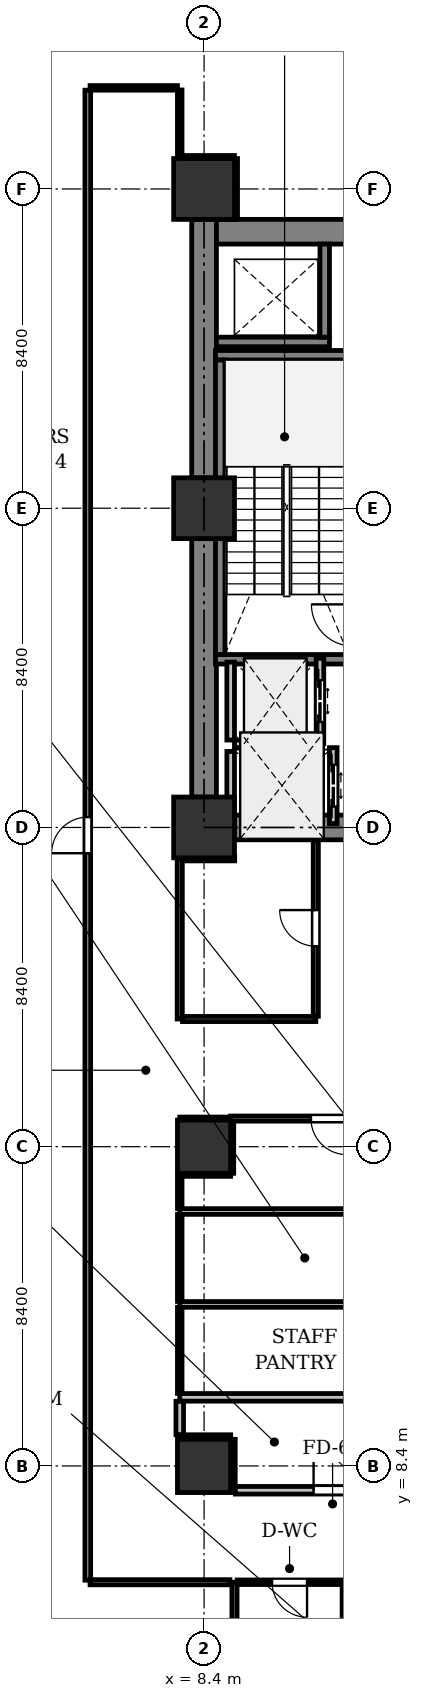
"""IFC4 building model, lengths in metres.
Left out: names, types, materials, properties, quantities, classifications, styles, units other than length and angle.
Written with IfcOpenShell. Run it as: python <this file> out.ifc"""

import sys

from ifc_helpers import new_model, si_unit, direction, frame, frame_2d, origin, origin_2d, place, context, subcontext, project, spatial, rectangle, extrude, element, fill, save


model = new_model("IFC4")
c1 = context("Model", 3, precision=1e-05, world=origin(), true_north=direction((0.0, 1.0)))
c2 = subcontext(c1, "Body", "Model", "MODEL_VIEW")
j1 = project(units=[si_unit("LENGTHUNIT", "METRE"), si_unit("PLANEANGLEUNIT", "RADIAN")], contexts=[c1])
p1 = place(None, origin())
s1 = spatial("IfcSite", under=j1, at=p1, CompositionType="ELEMENT")
p2 = place(p1, origin())
s2 = spatial("IfcBuilding", under=s1, at=p2, CompositionType="ELEMENT")
p3 = place(p2, frame((0.0, 0.0, 10.2)))
s3 = spatial("IfcBuildingStorey", under=s2, at=p3, CompositionType="ELEMENT", Elevation=10.2)
for number, where, z_axis, x_axis in (
    (1, (8.4, 8.4, 0.0), (0.0, 0.0, 1.0), (1.0, 0.0, 0.0)),
    (2, (8.4, 16.8, 0.0), (0.0, 0.0, 1.0), (1.0, 0.0, 0.0)),
):
    element("IfcColumn", number, at=place(p3, frame(where, z_axis=z_axis, x_axis=x_axis)), inside=s3, PredefinedType="COLUMN", context=c2, shape_type="SweptSolid", body=[
        extrude(rectangle(XDim=1.4, YDim=1.4, at=origin_2d()), origin(), (0.0, 0.0, 1.0), 4.8),
    ])
for number, where, z_axis, x_axis in (
    (3, (8.4, 25.2, 0.0), (0.0, 0.0, 1.0), (1.0, 0.0, 0.0)),
    (4, (8.4, 33.6, 0.0), (0.0, 0.0, 1.0), (1.0, 0.0, 0.0)),
    (5, (8.4, 42.0, 0.0), (0.0, 0.0, 1.0), (1.0, 0.0, 0.0)),
):
    element("IfcColumn", number, at=place(p3, frame(where, z_axis=z_axis, x_axis=x_axis)), inside=s3, PredefinedType="COLUMN", context=c2, shape_type="SweptSolid", body=[
        extrude(rectangle(XDim=1.6, YDim=1.6, at=origin_2d()), origin(), (0.0, 0.0, 1.0), 4.8),
    ])
for number, where, z_axis, x_axis in (
    (6, (8.4, 26.0, 0.0), (0.0, 0.0, 1.0), (0.0, 1.0, 0.0)),
    (7, (8.4, 34.4, 0.0), (0.0, 0.0, 1.0), (0.0, 1.0, 0.0)),
):
    element("IfcWall", number, at=place(p3, frame(where, z_axis=z_axis, x_axis=x_axis)), inside=s3, PredefinedType="SHEAR", context=c2, shape_type="SweptSolid", body=[
        extrude(rectangle(XDim=6.8, YDim=0.65, at=frame_2d((3.4, 0.0))), origin(), (0.0, 0.0, 1.0), 4.525),
    ])
p4 = place(p3, frame((8.725, 40.875, 0.0), z_axis=(0.0, 0.0, 1.0), x_axis=(1.0, 0.0, 0.0)))
e8 = element("IfcWall", 8, at=p4, inside=s3, PredefinedType="SHEAR", context=c2, shape_type="SweptSolid", body=[
    extrude(rectangle(XDim=7.75, YDim=0.65, at=frame_2d((3.875, 0.0))), origin(), (0.0, 0.0, 1.0), 4.525),
])
p5 = place(p3, frame((9.2, 25.2, 0.0), z_axis=(0.0, 0.0, 1.0), x_axis=(1.0, 0.0, 0.0)))
e9 = element("IfcWall", 9, at=p5, inside=s3, PredefinedType="SHEAR", context=c2, shape_type="SweptSolid", body=[
    extrude(rectangle(XDim=6.8, YDim=0.65, at=frame_2d((3.4, 0.0))), origin(), (0.0, 0.0, 1.0), 4.525),
])
p6 = place(p5, frame((3.5, 0.0, 0.0)))
e10 = element("IfcOpeningElement", 10, at=p6, cuts=e9, PredefinedType="OPENING", context=c2, shape_type="SweptSolid", body=[
    extrude(rectangle(XDim=1.1, YDim=2.15, at=frame_2d((0.55, 1.075))), frame((0.0, 0.335, 0.0), z_axis=(0.0, -1.0, 0.0), x_axis=(1.0, 0.0, 0.0)), (0.0, 0.0, 1.0), 0.67),
])
for number, where, z_axis, x_axis in (
    (11, (12.45, 29.625, 0.0), (0.0, 0.0, 1.0), (-1.0, 0.0, 0.0)),
    (12, (12.45, 37.625, 0.0), (0.0, 0.0, 1.0), (-1.0, 0.0, 0.0)),
):
    element("IfcWall", number, at=place(p3, frame(where, z_axis=z_axis, x_axis=x_axis)), inside=s3, PredefinedType="SHEAR", context=c2, shape_type="SweptSolid", body=[
        extrude(rectangle(XDim=3.75, YDim=0.25, at=frame_2d((1.875, 0.0))), origin(), (0.0, 0.0, 1.0), 4.525),
    ])
p7 = place(p3, frame((8.825, 29.75, 0.0), z_axis=(0.0, 0.0, 1.0), x_axis=(0.0, 1.0, 0.0)))
e13 = element("IfcWall", 13, at=p7, inside=s3, PredefinedType="SHEAR", context=c2, shape_type="SweptSolid", body=[
    extrude(rectangle(XDim=7.75, YDim=0.25, at=frame_2d((3.875, 0.0))), origin(), (0.0, 0.0, 1.0), 4.525),
])
p8 = place(p3, frame((8.725, 37.975, 0.0), z_axis=(0.0, 0.0, 1.0), x_axis=(1.0, 0.0, 0.0)))
e14 = element("IfcWall", 14, at=p8, inside=s3, PredefinedType="SHEAR", context=c2, shape_type="SweptSolid", body=[
    extrude(rectangle(XDim=2.975, YDim=0.25, at=frame_2d((1.487, 0.0))), origin(), (0.0, 0.0, 1.0), 4.525),
])
p9 = place(p3, frame((11.575, 38.1, 0.0), z_axis=(0.0, 0.0, 1.0), x_axis=(0.0, 1.0, 0.0)))
e15 = element("IfcWall", 15, at=p9, inside=s3, PredefinedType="SHEAR", context=c2, shape_type="SweptSolid", body=[
    extrude(rectangle(XDim=2.45, YDim=0.25, at=frame_2d((1.225, 0.0))), origin(), (0.0, 0.0, 1.0), 4.525),
])
p10 = place(p3, frame((11.45, 27.4, 0.0), z_axis=(0.0, 0.0, 1.0), x_axis=(0.0, 1.0, 0.0)))
e16 = element("IfcWall", 16, at=p10, inside=s3, PredefinedType="PARTITIONING", context=c2, shape_type="SweptSolid", body=[
    extrude(rectangle(XDim=2.25, YDim=0.2, at=frame_2d((1.125, 0.0))), origin(), (0.0, 0.0, 1.0), 4.525),
])
p11 = place(p10, frame((0.575, 0.0, 0.0)))
e17 = element("IfcOpeningElement", 17, at=p11, cuts=e16, PredefinedType="OPENING", context=c2, shape_type="SweptSolid", body=[
    extrude(rectangle(XDim=1.1, YDim=2.2, at=frame_2d((0.55, 1.1))), frame((0.0, 0.11, 0.0), z_axis=(0.0, -1.0, 0.0), x_axis=(1.0, 0.0, 0.0)), (0.0, 0.0, 1.0), 0.22),
])
p12 = place(p3, frame((9.1, 27.5, 0.0), z_axis=(0.0, 0.0, 1.0), x_axis=(0.0, 1.0, 0.0)))
e18 = element("IfcWall", 18, at=p12, inside=s3, PredefinedType="PARTITIONING", context=c2, shape_type="SweptSolid", body=[
    extrude(rectangle(XDim=2.05, YDim=0.2, at=frame_2d((1.025, 0.0))), origin(), (0.0, 0.0, 1.0), 4.525),
])
p13 = place(p3, frame((9.2, 27.4, 0.0), z_axis=(0.0, 0.0, 1.0), x_axis=(1.0, 0.0, 0.0)))
e19 = element("IfcWall", 19, at=p13, inside=s3, PredefinedType="PARTITIONING", context=c2, shape_type="SweptSolid", body=[
    extrude(rectangle(XDim=2.15, YDim=0.2, at=frame_2d((1.075, 0.0))), origin(), (0.0, 0.0, 1.0), 4.525),
])
p14 = place(p3, frame((11.8, 25.3, 0.0), z_axis=(0.0, 0.0, 1.0), x_axis=(0.0, 1.0, 0.0)))
e20 = element("IfcWall", 20, at=p14, inside=s3, PredefinedType="PARTITIONING", context=c2, shape_type="SweptSolid", body=[
    extrude(rectangle(XDim=2.0, YDim=0.2, at=frame_2d((1.0, 0.0))), origin(), (0.0, 0.0, 1.0), 4.525),
])
p15 = place(p14, frame((0.45, 0.0, 0.0)))
e21 = element("IfcOpeningElement", 21, at=p15, cuts=e20, PredefinedType="OPENING", context=c2, shape_type="SweptSolid", body=[
    extrude(rectangle(XDim=1.1, YDim=2.2, at=frame_2d((0.55, 1.1))), frame((0.0, 0.11, 0.0), z_axis=(0.0, -1.0, 0.0), x_axis=(1.0, 0.0, 0.0)), (0.0, 0.0, 1.0), 0.22),
])
p16 = place(p3, frame((9.1, 25.4, 0.0), z_axis=(0.0, 0.0, 1.0), x_axis=(0.0, 1.0, 0.0)))
e22 = element("IfcWall", 22, at=p16, inside=s3, PredefinedType="PARTITIONING", context=c2, shape_type="SweptSolid", body=[
    extrude(rectangle(XDim=1.8, YDim=0.2, at=frame_2d((0.9, 0.0))), origin(), (0.0, 0.0, 1.0), 4.525),
])
for number, where, z_axis, x_axis in (
    (23, (9.2, 5.34, 0.0), (0.0, 0.0, 1.0), (0.0, -1.0, 0.0)),
    (24, (12.1, 0.124, 0.0), (0.0, 0.0, 1.0), (0.0, 1.0, 0.0)),
):
    element("IfcWall", number, at=place(p3, frame(where, z_axis=z_axis, x_axis=x_axis)), inside=s3, PredefinedType="PARTITIONING", context=c2, shape_type="SweptSolid", body=[
        extrude(rectangle(XDim=5.216, YDim=0.135, at=frame_2d((2.608, 0.0))), origin(), (0.0, 0.0, 1.0), 4.525),
    ])
p17 = place(p3, frame((12.029, 5.34, 0.0), z_axis=(0.0, 0.0, 1.0), x_axis=(-1.0, 0.0, 0.0)))
e25 = element("IfcWall", 25, at=p17, inside=s3, PredefinedType="PARTITIONING", context=c2, shape_type="SweptSolid", body=[
    extrude(rectangle(XDim=2.757, YDim=0.12, at=frame_2d((1.378, 0.0))), origin(), (0.0, 0.0, 1.0), 4.525),
])
p18 = place(p17, frame((0.918, 0.0, 0.0)))
e26 = element("IfcOpeningElement", 26, at=p18, cuts=e25, PredefinedType="OPENING", context=c2, shape_type="SweptSolid", body=[
    extrude(rectangle(XDim=0.92, YDim=2.1, at=frame_2d((0.46, 1.05))), frame((0.0, 0.07, 0.0), z_axis=(0.0, -1.0, 0.0), x_axis=(1.0, 0.0, 0.0)), (0.0, 0.0, 1.0), 0.14),
])
p19 = place(p3, frame((7.76, 9.12, 0.0), z_axis=(0.0, 0.0, 1.0), x_axis=(1.0, 0.0, 0.0)))
e27 = element("IfcWall", 27, at=p19, inside=s3, PredefinedType="PARTITIONING", context=c2, shape_type="SweptSolid", body=[
    extrude(rectangle(XDim=1.34, YDim=0.2, at=frame_2d((0.67, 0.0))), origin(), (0.0, 0.0, 1.0), 3.913),
])
p20 = place(p3, frame((9.12, 9.1, 0.0), z_axis=(0.0, 0.0, 1.0), x_axis=(0.0, -1.0, 0.0)))
e28 = element("IfcWall", 28, at=p20, inside=s3, PredefinedType="PARTITIONING", context=c2, shape_type="SweptSolid", body=[
    extrude(rectangle(XDim=1.34, YDim=0.2, at=frame_2d((0.67, 0.0))), origin(), (0.0, 0.0, 1.0), 3.725),
])
p21 = place(p3, frame((9.224, 7.76, 0.0), z_axis=(0.0, 0.0, 1.0), x_axis=(1.0, 0.0, 0.0)))
e29 = element("IfcWall", 29, at=p21, inside=s3, PredefinedType="PARTITIONING", context=c2, shape_type="SweptSolid", body=[
    extrude(rectangle(XDim=5.116, YDim=0.2, at=frame_2d((2.558, 0.0))), origin(), (0.0, 0.0, 1.0), 4.122),
])
p22 = place(p21, frame((2.058, 0.0, 0.0)))
e30 = element("IfcOpeningElement", 30, at=p22, cuts=e29, PredefinedType="OPENING", context=c2, shape_type="SweptSolid", body=[
    extrude(rectangle(XDim=1.0, YDim=2.15, at=frame_2d((0.5, 1.075))), frame((0.0, 0.11, 0.0), z_axis=(0.0, -1.0, 0.0), x_axis=(1.0, 0.0, 0.0)), (0.0, 0.0, 1.0), 0.22),
])
p23 = place(p3, frame((14.236, 10.205, 0.0), z_axis=(0.0, 0.0, 1.0), x_axis=(-1.0, 0.0, 0.0)))
e31 = element("IfcWall", 31, at=p23, inside=s3, PredefinedType="PARTITIONING", context=c2, shape_type="SweptSolid", body=[
    extrude(rectangle(XDim=6.476, YDim=0.2, at=frame_2d((3.238, 0.0))), origin(), (0.0, 0.0, 1.0), 3.913),
])
p24 = place(p3, frame((7.76, 10.101, 0.0), z_axis=(0.0, 0.0, 1.0), x_axis=(0.0, -1.0, 0.0)))
e32 = element("IfcWall", 32, at=p24, inside=s3, PredefinedType="PARTITIONING", context=c2, shape_type="SweptSolid", body=[
    extrude(rectangle(XDim=0.877, YDim=0.2, at=frame_2d((0.438, 0.0))), origin(), (0.0, 0.0, 1.0), 4.525),
])
p25 = place(p3, frame((7.76, 12.65, 0.0), z_axis=(0.0, 0.0, 1.0), x_axis=(1.0, 0.0, 0.0)))
e33 = element("IfcWall", 33, at=p25, inside=s3, PredefinedType="PARTITIONING", context=c2, shape_type="SweptSolid", body=[
    extrude(rectangle(XDim=6.58, YDim=0.15, at=frame_2d((3.29, 0.0))), origin(), (0.0, 0.0, 1.0), 3.913),
])
p26 = place(p3, frame((14.276, 15.095, 0.0), z_axis=(0.0, 0.0, 1.0), x_axis=(-1.0, 0.0, 0.0)))
e34 = element("IfcWall", 34, at=p26, inside=s3, PredefinedType="PARTITIONING", context=c2, shape_type="SweptSolid", body=[
    extrude(rectangle(XDim=6.516, YDim=0.15, at=frame_2d((3.258, 0.0))), origin(), (0.0, 0.0, 1.0), 3.913),
])
p27 = place(p3, frame((7.76, 15.016, 0.0), z_axis=(0.0, 0.0, 1.0), x_axis=(0.0, -1.0, 0.0)))
e35 = element("IfcWall", 35, at=p27, inside=s3, PredefinedType="PARTITIONING", context=c2, shape_type="SweptSolid", body=[
    extrude(rectangle(XDim=2.287, YDim=0.12, at=frame_2d((1.144, 0.0))), origin(), (0.0, 0.0, 1.0), 4.525),
])
p28 = place(p3, frame((7.76, 17.52, 0.0), z_axis=(0.0, 0.0, 1.0), x_axis=(1.0, 0.0, 0.0)))
e36 = element("IfcWall", 36, at=p28, inside=s3, PredefinedType="PARTITIONING", context=c2, shape_type="SweptSolid", body=[
    extrude(rectangle(XDim=1.34, YDim=0.12, at=frame_2d((0.67, 0.0))), origin(), (0.0, 0.0, 1.0), 3.913),
])
p29 = place(p3, frame((9.12, 17.5, 0.0), z_axis=(0.0, 0.0, 1.0), x_axis=(0.0, -1.0, 0.0)))
e37 = element("IfcWall", 37, at=p29, inside=s3, PredefinedType="PARTITIONING", context=c2, shape_type="SweptSolid", body=[
    extrude(rectangle(XDim=1.4, YDim=0.12, at=frame_2d((0.7, 0.0))), origin(), (0.0, 0.0, 1.0), 3.725),
])
p30 = place(p3, frame((9.1, 16.08, 0.0), z_axis=(0.0, 0.0, 1.0), x_axis=(-1.0, 0.0, 0.0)))
e38 = element("IfcWall", 38, at=p30, inside=s3, PredefinedType="PARTITIONING", context=c2, shape_type="SweptSolid", body=[
    extrude(rectangle(XDim=1.34, YDim=0.12, at=frame_2d((0.67, 0.0))), origin(), (0.0, 0.0, 1.0), 3.913),
])
p31 = place(p3, frame((7.76, 16.016, 0.0), z_axis=(0.0, 0.0, 1.0), x_axis=(0.0, -1.0, 0.0)))
e39 = element("IfcWall", 39, at=p31, inside=s3, PredefinedType="PARTITIONING", context=c2, shape_type="SweptSolid", body=[
    extrude(rectangle(XDim=0.842, YDim=0.12, at=frame_2d((0.421, 0.0))), origin(), (0.0, 0.0, 1.0), 4.525),
])
p32 = place(p3, frame((14.276, 17.54, 0.0), z_axis=(0.0, 0.0, 1.0), x_axis=(-1.0, 0.0, 0.0)))
e40 = element("IfcWall", 40, at=p32, inside=s3, PredefinedType="PARTITIONING", context=c2, shape_type="SweptSolid", body=[
    extrude(rectangle(XDim=5.176, YDim=0.135, at=frame_2d((2.588, 0.0))), origin(), (0.0, 0.0, 1.0), 4.525),
])
p33 = place(p32, frame((2.113, 0.0, 0.0)))
e41 = element("IfcOpeningElement", 41, at=p33, cuts=e40, PredefinedType="OPENING", context=c2, shape_type="SweptSolid", body=[
    extrude(rectangle(XDim=0.95, YDim=2.15, at=frame_2d((0.475, 1.075))), frame((0.0, 0.077, 0.0), z_axis=(0.0, -1.0, 0.0), x_axis=(1.0, 0.0, 0.0)), (0.0, 0.0, 1.0), 0.155),
])
p34 = place(p3, frame((7.76, 12.571, 0.0), z_axis=(0.0, 0.0, 1.0), x_axis=(0.0, -1.0, 0.0)))
e42 = element("IfcWall", 42, at=p34, inside=s3, PredefinedType="PARTITIONING", context=c2, shape_type="SweptSolid", body=[
    extrude(rectangle(XDim=2.262, YDim=0.12, at=frame_2d((1.131, 0.0))), origin(), (0.0, 0.0, 1.0), 4.525),
])
p35 = place(p3, frame((9.206, 24.381, 0.0), z_axis=(0.0, 0.0, 1.0), x_axis=(-0.999999771885, -0.00067544733, 0.0)))
e43 = element("IfcWall", 43, at=p35, inside=s3, PredefinedType="PARTITIONING", context=c2, shape_type="SweptSolid", body=[
    extrude(rectangle(XDim=1.446, YDim=0.12, at=frame_2d((0.723, 0.0))), origin(), (0.0, 0.0, 1.0), 3.913),
])
p36 = place(p3, frame((7.76, 24.38, 0.0), z_axis=(0.0, 0.0, 1.0), x_axis=(0.0, -1.0, 0.0)))
e44 = element("IfcWall", 44, at=p36, inside=s3, PredefinedType="PARTITIONING", context=c2, shape_type="SweptSolid", body=[
    extrude(rectangle(XDim=4.22, YDim=0.135, at=frame_2d((2.11, 0.0))), origin(), (0.0, 0.0, 1.0), 4.525),
])
p37 = place(p3, frame((7.832, 20.16, 0.0), z_axis=(0.0, 0.0, 1.0), x_axis=(1.0, 0.0, 0.0)))
e45 = element("IfcWall", 45, at=p37, inside=s3, PredefinedType="PARTITIONING", context=c2, shape_type="SweptSolid", body=[
    extrude(rectangle(XDim=3.509, YDim=0.135, at=frame_2d((1.754, 0.0))), origin(), (0.0, 0.0, 1.0), 3.913),
])
p38 = place(p3, frame((11.34, 20.231, 0.0), z_axis=(0.0, 0.0, 1.0), x_axis=(0.0, 1.0, 0.0)))
e46 = element("IfcWall", 46, at=p38, inside=s3, PredefinedType="PARTITIONING", context=c2, shape_type="SweptSolid", body=[
    extrude(rectangle(XDim=4.64, YDim=0.135, at=frame_2d((2.32, 0.0))), origin(), (0.0, 0.0, 1.0), 4.525),
])
p39 = place(p38, frame((1.845, 0.0, 0.0)))
e47 = element("IfcOpeningElement", 47, at=p39, cuts=e46, PredefinedType="OPENING", context=c2, shape_type="SweptSolid", body=[
    extrude(rectangle(XDim=0.95, YDim=2.15, at=frame_2d((0.475, 1.075))), frame((0.0, 0.077, 0.0), z_axis=(0.0, -1.0, 0.0), x_axis=(1.0, 0.0, 0.0)), (0.0, 0.0, 1.0), 0.155),
])
p40 = place(p3, frame((7.76, 42.82, 0.0), z_axis=(0.0, 0.0, 1.0), x_axis=(1.0, 0.0, 0.0)))
e48 = element("IfcWall", 48, at=p40, inside=s3, PredefinedType="PARTITIONING", context=c2, shape_type="SweptSolid", body=[
    extrude(rectangle(XDim=1.44, YDim=0.12, at=frame_2d((0.72, 0.0))), origin(), (0.0, 0.0, 1.0), 3.913),
])
p41 = place(p3, frame((9.22, 42.8, 0.0), z_axis=(0.0, 0.0, 1.0), x_axis=(0.0, -1.0, 0.0)))
e49 = element("IfcWall", 49, at=p41, inside=s3, PredefinedType="PARTITIONING", context=c2, shape_type="SweptSolid", body=[
    extrude(rectangle(XDim=1.596, YDim=0.12, at=frame_2d((0.798, 0.0))), origin(), (0.0, 0.0, 1.0), 3.725),
])
p42 = place(p3, frame((9.08, 5.34, 0.0), z_axis=(0.0, 0.0, 1.0), x_axis=(-1.0, 0.0, 0.0)))
e50 = element("IfcWall", 50, at=p42, inside=s3, PredefinedType="PARTITIONING", context=c2, shape_type="SweptSolid", body=[
    extrude(rectangle(XDim=3.68, YDim=0.135, at=frame_2d((1.84, 0.0))), origin(), (0.0, 0.0, 1.0), 3.913),
])
p43 = place(p3, frame((5.34, 5.394, 0.0), z_axis=(0.0, 0.0, 1.0), x_axis=(-6.227115e-06, 0.999999999981, 0.0)))
e51 = element("IfcWall", 51, at=p43, inside=s3, PredefinedType="PARTITIONING", context=c2, shape_type="SweptSolid", body=[
    extrude(rectangle(XDim=39.206, YDim=0.15, at=frame_2d((19.603, 0.0))), origin(), (0.0, 0.0, 1.0), 3.725),
])
p44 = place(p43, frame((19.128, 0.0, 0.0)))
e52 = element("IfcOpeningElement", 52, at=p44, cuts=e51, PredefinedType="OPENING", context=c2, shape_type="SweptSolid", body=[
    extrude(rectangle(XDim=0.95, YDim=2.15, at=frame_2d((0.475, 1.075))), frame((0.0, 0.085, 0.0), z_axis=(0.0, -1.0, 0.0), x_axis=(1.0, 0.0, 0.0)), (0.0, 0.0, 1.0), 0.17),
])
p45 = place(p3, frame((5.4, 44.66, 0.0), z_axis=(0.0, 0.0, 1.0), x_axis=(1.0, 0.0, 0.0)))
e53 = element("IfcWall", 53, at=p45, inside=s3, PredefinedType="PARTITIONING", context=c2, shape_type="SweptSolid", body=[
    extrude(rectangle(XDim=2.3, YDim=0.12, at=frame_2d((1.15, 0.0))), origin(), (0.0, 0.0, 1.0), 4.525),
])
p46 = place(p3, frame((7.76, 44.606, 0.0), z_axis=(0.0, 0.0, 1.0), x_axis=(0.0, -1.0, 0.0)))
e54 = element("IfcWall", 54, at=p46, inside=s3, PredefinedType="PARTITIONING", context=c2, shape_type="SweptSolid", body=[
    extrude(rectangle(XDim=1.722, YDim=0.12, at=frame_2d((0.861, 0.0))), origin(), (0.0, 0.0, 1.0), 4.525),
])
p47 = place(p11, origin())
e55 = element("IfcDoor", 55, at=p47, inside=s3, OperationType="DOUBLE_DOOR_SLIDING", PredefinedType="DOOR", context=c2, shape_type="SweptSolid", body=[
    extrude(rectangle(XDim=1.1, YDim=2.2, at=frame_2d((0.55, 1.1))), frame((0.0, 0.025, 0.0), z_axis=(0.0, -1.0, 0.0), x_axis=(1.0, 0.0, 0.0)), (0.0, 0.0, 1.0), 0.05),
])
fill(e17, e55)
p48 = place(p15, origin())
e56 = element("IfcDoor", 56, at=p48, inside=s3, OperationType="DOUBLE_DOOR_SLIDING", PredefinedType="DOOR", context=c2, shape_type="SweptSolid", body=[
    extrude(rectangle(XDim=1.1, YDim=2.2, at=frame_2d((0.55, 1.1))), frame((0.0, 0.025, 0.0), z_axis=(0.0, -1.0, 0.0), x_axis=(1.0, 0.0, 0.0)), (0.0, 0.0, 1.0), 0.05),
])
fill(e21, e56)
p49 = place(p18, origin())
e57 = element("IfcDoor", 57, at=p49, inside=s3, OperationType="SINGLE_SWING_LEFT", PredefinedType="DOOR", context=c2, shape_type="SweptSolid", body=[
    extrude(rectangle(XDim=0.92, YDim=2.1, at=frame_2d((0.46, 1.05))), frame((0.0, 0.025, 0.0), z_axis=(0.0, -1.0, 0.0), x_axis=(1.0, 0.0, 0.0)), (0.0, 0.0, 1.0), 0.05),
])
fill(e26, e57)
p50 = place(p22, origin())
e58 = element("IfcDoor", 58, at=p50, inside=s3, OperationType="SINGLE_SWING_LEFT", PredefinedType="DOOR", context=c2, shape_type="SweptSolid", body=[
    extrude(rectangle(XDim=1.0, YDim=2.15, at=frame_2d((0.5, 1.075))), frame((0.0, 0.025, 0.0), z_axis=(0.0, -1.0, 0.0), x_axis=(1.0, 0.0, 0.0)), (0.0, 0.0, 1.0), 0.05),
])
fill(e30, e58)
p51 = place(p33, origin())
e59 = element("IfcDoor", 59, at=p51, inside=s3, OperationType="SINGLE_SWING_LEFT", PredefinedType="DOOR", context=c2, shape_type="SweptSolid", body=[
    extrude(rectangle(XDim=0.95, YDim=2.15, at=frame_2d((0.475, 1.075))), frame((0.0, 0.025, 0.0), z_axis=(0.0, -1.0, 0.0), x_axis=(1.0, 0.0, 0.0)), (0.0, 0.0, 1.0), 0.05),
])
fill(e41, e59)
p52 = place(p39, origin())
e60 = element("IfcDoor", 60, at=p52, inside=s3, OperationType="SINGLE_SWING_RIGHT", PredefinedType="DOOR", context=c2, shape_type="SweptSolid", body=[
    extrude(rectangle(XDim=0.95, YDim=2.15, at=frame_2d((0.475, 1.075))), frame((0.0, 0.025, 0.0), z_axis=(0.0, -1.0, 0.0), x_axis=(1.0, 0.0, 0.0)), (0.0, 0.0, 1.0), 0.05),
])
fill(e47, e60)
p53 = place(p44, origin())
e61 = element("IfcDoor", 61, at=p53, inside=s3, OperationType="SINGLE_SWING_LEFT", PredefinedType="DOOR", context=c2, shape_type="SweptSolid", body=[
    extrude(rectangle(XDim=0.95, YDim=2.15, at=frame_2d((0.475, 1.075))), frame((0.0, 0.025, 0.0), z_axis=(0.0, -1.0, 0.0), x_axis=(1.0, 0.0, 0.0)), (0.0, 0.0, 1.0), 0.05),
])
fill(e52, e61)
save(model, sys.argv[1])
